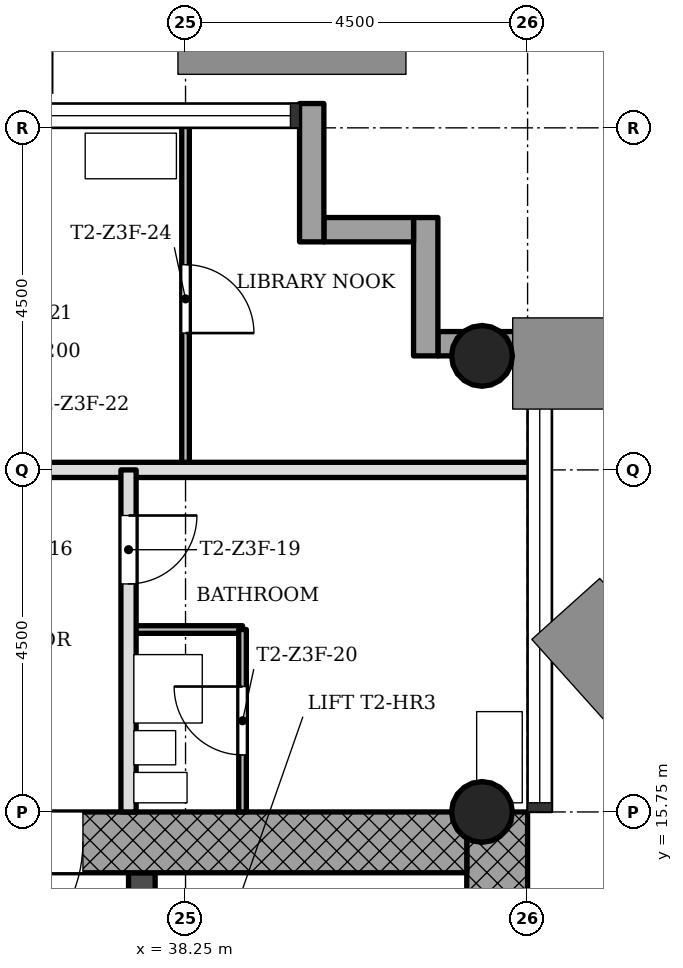
"""IFC4 building model, lengths in metres.
Left out: names, types, materials, properties, quantities, classifications, styles, units other than length and angle.
Written with IfcOpenShell. Run it as: python <this file> out.ifc"""

import sys

from ifc_helpers import new_model, si_unit, direction, frame, frame_2d, origin, origin_2d, place, context, subcontext, project, spatial, rectangle, hollow_circle, extrude, element, fill, save


model = new_model("IFC4")
c1 = context("Model", 3, precision=1e-05, world=origin(), true_north=direction((0.0, 1.0)))
c2 = subcontext(c1, "Body", "Model", "MODEL_VIEW")
j1 = project(units=[si_unit("LENGTHUNIT", "METRE"), si_unit("PLANEANGLEUNIT", "RADIAN")], contexts=[c1])
p1 = place(None, origin())
s1 = spatial("IfcSite", under=j1, at=p1, CompositionType="ELEMENT")
p2 = place(p1, origin())
s2 = spatial("IfcBuilding", under=s1, at=p2, CompositionType="ELEMENT")
p3 = place(p2, frame((0.0, 0.0, 164.3)))
s3 = spatial("IfcBuildingStorey", under=s2, at=p3, CompositionType="ELEMENT", Elevation=164.3)
p4 = place(p3, frame((42.35, 7.55, 0.0), z_axis=(0.0, 0.0, 1.0), x_axis=(0.0, 1.0, 0.0)))
e1 = element("IfcWall", 1, at=p4, inside=s3, PredefinedType="SHEAR", context=c2, shape_type="SweptSolid", body=[
    extrude(rectangle(XDim=8.2, YDim=0.8, at=frame_2d((4.1, 0.0))), origin(), (0.0, 0.0, 1.0), 3.4),
])
p5 = place(p3, frame((41.95, 15.35, 0.0), z_axis=(0.0, 0.0, 1.0), x_axis=(-1.0, 0.0, 0.0)))
e2 = element("IfcWall", 2, at=p5, inside=s3, PredefinedType="SHEAR", context=c2, shape_type="SweptSolid", body=[
    extrude(rectangle(XDim=12.7, YDim=0.8, at=frame_2d((6.35, 0.0))), origin(), (0.0, 0.0, 1.0), 3.4),
])
p6 = place(p5, frame((5.05, 0.0, 0.0)))
e3 = element("IfcOpeningElement", 3, at=p6, cuts=e2, PredefinedType="OPENING", context=c2, shape_type="SweptSolid", body=[
    extrude(rectangle(XDim=1.8, YDim=2.1, at=frame_2d((0.9, 1.05))), frame((0.0, 0.41, 0.0), z_axis=(0.0, -1.0, 0.0), x_axis=(1.0, 0.0, 0.0)), (0.0, 0.0, 1.0), 0.82),
])
p7 = place(p3, frame((37.675, 7.55, 0.0), z_axis=(0.0, 0.0, 1.0), x_axis=(0.0, 1.0, 0.0)))
e4 = element("IfcWall", 4, at=p7, inside=s3, PredefinedType="SHEAR", context=c2, shape_type="SweptSolid", body=[
    extrude(rectangle(XDim=7.4, YDim=0.35, at=frame_2d((3.7, 0.0))), origin(), (0.0, 0.0, 1.0), 3.4),
])
p8 = place(p7, frame((0.95, 0.0, 0.0)))
e5 = element("IfcOpeningElement", 5, at=p8, cuts=e4, PredefinedType="OPENING", context=c2, shape_type="SweptSolid", body=[
    extrude(rectangle(XDim=1.1, YDim=2.1, at=frame_2d((0.55, 1.05))), frame((0.0, 0.185, 0.0), z_axis=(0.0, -1.0, 0.0), x_axis=(1.0, 0.0, 0.0)), (0.0, 0.0, 1.0), 0.37),
])
p9 = place(p7, frame((3.15, 0.0, 0.0)))
e6 = element("IfcOpeningElement", 6, at=p9, cuts=e4, PredefinedType="OPENING", context=c2, shape_type="SweptSolid", body=[
    extrude(rectangle(XDim=1.1, YDim=2.1, at=frame_2d((0.55, 1.05))), frame((0.0, 0.185, 0.0), z_axis=(0.0, -1.0, 0.0), x_axis=(1.0, 0.0, 0.0)), (0.0, 0.0, 1.0), 0.37),
])
p10 = place(p7, frame((5.35, 0.0, 0.0)))
e7 = element("IfcOpeningElement", 7, at=p10, cuts=e4, PredefinedType="OPENING", context=c2, shape_type="SweptSolid", body=[
    extrude(rectangle(XDim=1.1, YDim=2.1, at=frame_2d((0.55, 1.05))), frame((0.0, 0.185, 0.0), z_axis=(0.0, -1.0, 0.0), x_axis=(1.0, 0.0, 0.0)), (0.0, 0.0, 1.0), 0.37),
])
for number, where, z_axis, x_axis in (
    (8, (42.15, 15.75, 0.0), (0.0, 0.0, 1.0), (1.0, 0.0, 0.0)),
    (9, (42.15, 21.75, 0.0), (0.0, 0.0, 1.0), (1.0, 0.0, 0.0)),
):
    element("IfcColumn", number, at=place(p3, frame(where, z_axis=z_axis, x_axis=x_axis)), inside=s3, PredefinedType="COLUMN", context=c2, shape_type="SweptSolid", body=[
        extrude(hollow_circle(Radius=0.4, WallThickness=0.028, at=origin_2d()), origin(), (0.0, 0.0, 1.0), 3.4),
    ])
p11 = place(p3, frame((43.07, 21.91, -0.3), z_axis=(0.0, 0.0, 1.0), x_axis=(-1.0, 0.0, 0.0)))
e10 = element("IfcWall", 10, at=p11, inside=s3, PredefinedType="STANDARD", context=c2, shape_type="SweptSolid", body=[
    extrude(rectangle(XDim=1.5, YDim=0.32, at=frame_2d((0.75, 0.0))), origin(), (0.0, 0.0, 1.0), 3.4),
])
p12 = place(p3, frame((41.41, 21.75, -0.3), z_axis=(0.0, 0.0, 1.0), x_axis=(0.0, 1.0, 0.0)))
e11 = element("IfcWall", 11, at=p12, inside=s3, PredefinedType="STANDARD", context=c2, shape_type="SweptSolid", body=[
    extrude(rectangle(XDim=1.82, YDim=0.32, at=frame_2d((0.91, 0.0))), origin(), (0.0, 0.0, 1.0), 3.4),
])
p13 = place(p3, frame((41.25, 23.41, -0.3), z_axis=(0.0, 0.0, 1.0), x_axis=(-1.0, 0.0, 0.0)))
e12 = element("IfcWall", 12, at=p13, inside=s3, PredefinedType="STANDARD", context=c2, shape_type="SweptSolid", body=[
    extrude(rectangle(XDim=1.18, YDim=0.32, at=frame_2d((0.59, 0.0))), origin(), (0.0, 0.0, 1.0), 3.4),
])
p14 = place(p3, frame((39.91, 23.25, -0.3), z_axis=(0.0, 0.0, 1.0), x_axis=(0.0, 1.0, 0.0)))
e13 = element("IfcWall", 13, at=p14, inside=s3, PredefinedType="STANDARD", context=c2, shape_type="SweptSolid", body=[
    extrude(rectangle(XDim=1.82, YDim=0.32, at=frame_2d((0.91, 0.0))), origin(), (0.0, 0.0, 1.0), 3.4),
])
p15 = place(p3, frame((39.0, 18.15, 0.0), z_axis=(0.0, 0.0, 1.0), x_axis=(-1.0, 0.0, 0.0)))
e14 = element("IfcWall", 14, at=p15, inside=s3, PredefinedType="PARTITIONING", context=c2, shape_type="SweptSolid", body=[
    extrude(rectangle(XDim=1.5, YDim=0.1, at=frame_2d((0.75, 0.0))), origin(), (0.0, 0.0, 1.0), 3.0),
])
p16 = place(p3, frame((42.85, 20.25, 0.0), z_axis=(0.0, 0.0, 1.0), x_axis=(-1.0, 0.0, 0.0)))
e15 = element("IfcWall", 15, at=p16, inside=s3, PredefinedType="SOLIDWALL", context=c2, shape_type="SweptSolid", body=[
    extrude(rectangle(XDim=13.7, YDim=0.2, at=frame_2d((6.85, 0.0))), origin(), (0.0, 0.0, 1.0), 3.0),
])
p17 = place(p16, frame((6.4, 0.0, 0.0)))
e16 = element("IfcOpeningElement", 16, at=p17, cuts=e15, PredefinedType="OPENING", context=c2, shape_type="SweptSolid", body=[
    extrude(rectangle(XDim=0.9, YDim=2.1, at=frame_2d((0.45, 1.05))), frame((0.0, 0.11, 0.0), z_axis=(0.0, -1.0, 0.0), x_axis=(1.0, 0.0, 0.0)), (0.0, 0.0, 1.0), 0.22),
])
p18 = place(p3, frame((39.0, 15.75, 0.0), z_axis=(0.0, 0.0, 1.0), x_axis=(0.0, 1.0, 0.0)))
e17 = element("IfcWall", 17, at=p18, inside=s3, PredefinedType="PARTITIONING", context=c2, shape_type="SweptSolid", body=[
    extrude(rectangle(XDim=2.4, YDim=0.1, at=frame_2d((1.2, 0.0))), origin(), (0.0, 0.0, 1.0), 3.0),
])
p19 = place(p18, frame((0.75, 0.0, 0.0)))
e18 = element("IfcOpeningElement", 18, at=p19, cuts=e17, PredefinedType="OPENING", context=c2, shape_type="SweptSolid", body=[
    extrude(rectangle(XDim=0.9, YDim=2.1, at=frame_2d((0.45, 1.05))), frame((0.0, 0.06, 0.0), z_axis=(0.0, -1.0, 0.0), x_axis=(1.0, 0.0, 0.0)), (0.0, 0.0, 1.0), 0.12),
])
p20 = place(p3, frame((38.25, 20.25, 0.0), z_axis=(0.0, 0.0, 1.0), x_axis=(0.0, 1.0, 0.0)))
e19 = element("IfcWall", 19, at=p20, inside=s3, PredefinedType="PARTITIONING", context=c2, shape_type="SweptSolid", body=[
    extrude(rectangle(XDim=4.6, YDim=0.1, at=frame_2d((2.3, 0.0))), origin(), (0.0, 0.0, 1.0), 3.0),
])
p21 = place(p20, frame((1.8, 0.0, 0.0)))
e20 = element("IfcOpeningElement", 20, at=p21, cuts=e19, PredefinedType="OPENING", context=c2, shape_type="SweptSolid", body=[
    extrude(rectangle(XDim=0.9, YDim=2.1, at=frame_2d((0.45, 1.05))), frame((0.0, 0.06, 0.0), z_axis=(0.0, -1.0, 0.0), x_axis=(1.0, 0.0, 0.0)), (0.0, 0.0, 1.0), 0.12),
])
p22 = place(p3, frame((37.5, 15.75, 0.0), z_axis=(0.0, 0.0, 1.0), x_axis=(0.0, 1.0, 0.0)))
e21 = element("IfcWall", 21, at=p22, inside=s3, PredefinedType="SOLIDWALL", context=c2, shape_type="SweptSolid", body=[
    extrude(rectangle(XDim=4.5, YDim=0.2, at=frame_2d((2.25, 0.0))), origin(), (0.0, 0.0, 1.0), 3.0),
])
p23 = place(p22, frame((3.0, 0.0, 0.0)))
e22 = element("IfcOpeningElement", 22, at=p23, cuts=e21, PredefinedType="OPENING", context=c2, shape_type="SweptSolid", body=[
    extrude(rectangle(XDim=0.9, YDim=2.1, at=frame_2d((0.45, 1.05))), frame((0.0, 0.11, 0.0), z_axis=(0.0, -1.0, 0.0), x_axis=(1.0, 0.0, 0.0)), (0.0, 0.0, 1.0), 0.22),
])
p24 = place(p23, origin())
e23 = element("IfcDoor", 23, at=p24, inside=s3, OperationType="SINGLE_SWING_RIGHT", PredefinedType="DOOR", context=c2, shape_type="SweptSolid", body=[
    extrude(rectangle(XDim=0.9, YDim=2.1, at=frame_2d((0.45, 1.05))), frame((0.0, 0.025, 0.0), z_axis=(0.0, -1.0, 0.0), x_axis=(1.0, 0.0, 0.0)), (0.0, 0.0, 1.0), 0.05),
])
fill(e22, e23)
p25 = place(p19, origin())
e24 = element("IfcDoor", 24, at=p25, inside=s3, OperationType="SINGLE_SWING_LEFT", PredefinedType="DOOR", context=c2, shape_type="SweptSolid", body=[
    extrude(rectangle(XDim=0.9, YDim=2.1, at=frame_2d((0.45, 1.05))), frame((0.0, 0.025, 0.0), z_axis=(0.0, -1.0, 0.0), x_axis=(1.0, 0.0, 0.0)), (0.0, 0.0, 1.0), 0.05),
])
fill(e18, e24)
p26 = place(p21, origin())
e25 = element("IfcDoor", 25, at=p26, inside=s3, OperationType="SINGLE_SWING_LEFT", PredefinedType="DOOR", context=c2, shape_type="SweptSolid", body=[
    extrude(rectangle(XDim=0.9, YDim=2.1, at=frame_2d((0.45, 1.05))), frame((0.0, 0.025, 0.0), z_axis=(0.0, -1.0, 0.0), x_axis=(1.0, 0.0, 0.0)), (0.0, 0.0, 1.0), 0.05),
])
fill(e20, e25)
p27 = place(p6, origin())
e26 = element("IfcDoor", 26, at=p27, inside=s3, OperationType="SINGLE_SWING_LEFT", PredefinedType="DOOR", context=c2, shape_type="SweptSolid", body=[
    extrude(rectangle(XDim=1.8, YDim=2.1, at=frame_2d((0.9, 1.05))), frame((0.0, 0.025, 0.0), z_axis=(0.0, -1.0, 0.0), x_axis=(1.0, 0.0, 0.0)), (0.0, 0.0, 1.0), 0.05),
])
fill(e3, e26)
save(model, sys.argv[1])
